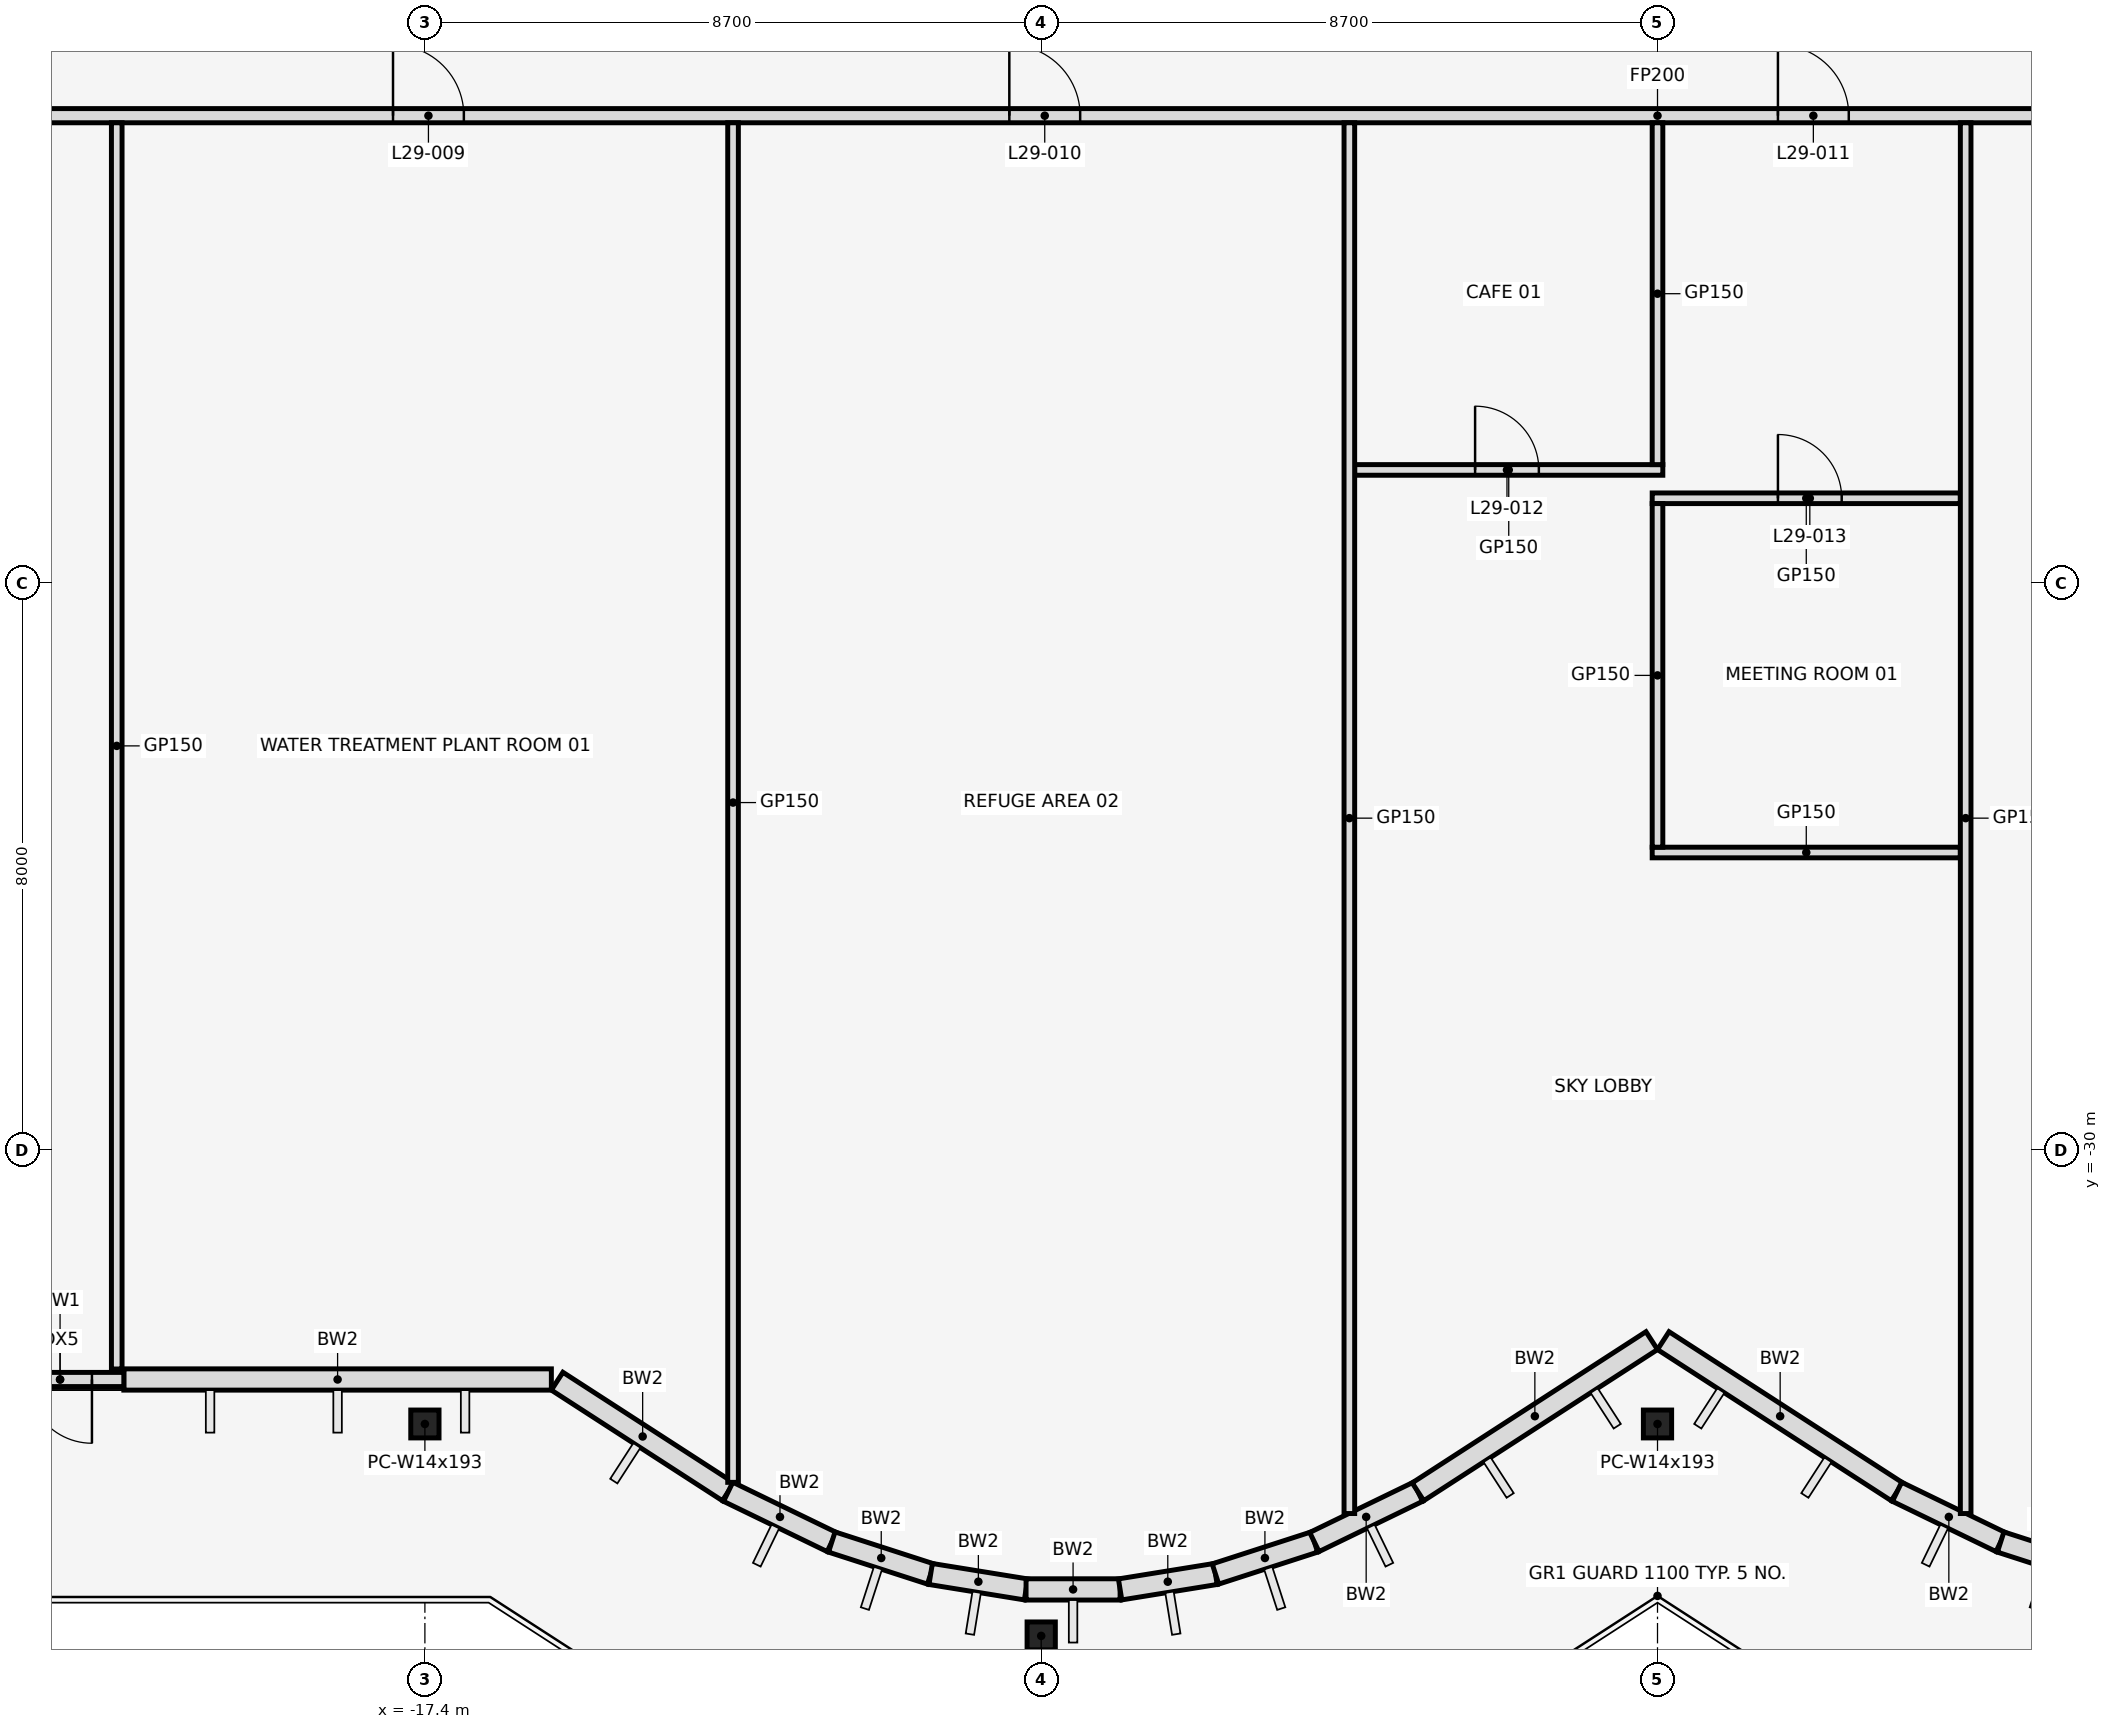
"""IFC4 building model, lengths in metres.
Left out: names, types, materials, properties, quantities, classifications, styles, units other than length and angle.
Written with IfcOpenShell. Run it as: python <this file> out.ifc"""

import sys

from ifc_helpers import new_model, si_unit, direction, frame, frame_2d, origin, origin_2d, place, context, subcontext, project, spatial, rectangle, i_section, extrude, element, fill, save


model = new_model("IFC4")
c1 = context("Model", 3, precision=1e-05, world=origin(), true_north=direction((0.0, 1.0)))
c2 = subcontext(c1, "Body", "Model", "MODEL_VIEW")
j1 = project(units=[si_unit("LENGTHUNIT", "METRE"), si_unit("PLANEANGLEUNIT", "RADIAN")], contexts=[c1])
p1 = place(None, origin())
s1 = spatial("IfcSite", under=j1, at=p1, CompositionType="ELEMENT")
p2 = place(p1, origin())
s2 = spatial("IfcBuilding", under=s1, at=p2, CompositionType="ELEMENT")
p3 = place(p2, frame((0.0, 0.0, 135.0)))
s3 = spatial("IfcBuildingStorey", under=s2, at=p3, CompositionType="ELEMENT", Elevation=135.0)
for number, where, z_axis, x_axis in (
    (1, (-17.4, -33.866, 0.0), (0.0, 0.0, 1.0), (1.0, 0.0, 0.0)),
    (2, (-8.7, -36.857, 0.0), (0.0, 0.0, 1.0), (1.0, 0.0, 0.0)),
    (3, (0.0, -33.866, 0.0), (0.0, 0.0, 1.0), (1.0, 0.0, 0.0)),
):
    element("IfcColumn", number, at=place(p3, frame(where, z_axis=z_axis, x_axis=x_axis)), inside=s3, PredefinedType="COLUMN", context=c2, shape_type="SweptSolid", body=[
        extrude(i_section(OverallWidth=0.399, OverallDepth=0.394, WebThickness=0.023, FlangeThickness=0.037, at=origin_2d()), origin(), (0.0, 0.0, 1.0), 5.4),
    ])
p4 = place(p3, frame((-21.65, -33.238, 0.0), z_axis=(0.0, 0.0, 1.0), x_axis=(1.0, 0.0, 0.0)))
e4 = element("IfcWall", 4, at=p4, inside=s3, PredefinedType="STANDARD", context=c2, shape_type="SweptSolid", body=[
    extrude(rectangle(XDim=6.035, YDim=0.3, at=frame_2d((3.018, 0.0))), origin(), (0.0, 0.0, 1.0), 4.28),
])
p5 = place(p3, frame((-15.533, -33.262, 0.0), z_axis=(0.0, 0.0, 1.0), x_axis=(0.839779682339, -0.542927329512, 0.0)))
e5 = element("IfcWall", 5, at=p5, inside=s3, PredefinedType="STANDARD", context=c2, shape_type="SweptSolid", body=[
    extrude(rectangle(XDim=2.875, YDim=0.3, at=frame_2d((1.438, 0.0))), origin(), (0.0, 0.0, 1.0), 4.26),
])
p6 = place(p3, frame((-13.119, -34.823, 0.0), z_axis=(0.0, 0.0, 1.0), x_axis=(0.899798026589, -0.436306671214, 0.0)))
e6 = element("IfcWall", 6, at=p6, inside=s3, PredefinedType="STANDARD", context=c2, shape_type="SweptSolid", body=[
    extrude(rectangle(XDim=1.625, YDim=0.3, at=frame_2d((0.813, 0.0))), origin(), (0.0, 0.0, 1.0), 4.26),
])
p7 = place(p3, frame((-11.656, -35.532, 0.0), z_axis=(0.0, 0.0, 1.0), x_axis=(0.951539081691, -0.307527845919, 0.0)))
e7 = element("IfcWall", 7, at=p7, inside=s3, PredefinedType="STANDARD", context=c2, shape_type="SweptSolid", body=[
    extrude(rectangle(XDim=1.467, YDim=0.3, at=frame_2d((0.733, 0.0))), origin(), (0.0, 0.0, 1.0), 5.25),
])
p8 = place(p3, frame((-10.26, -35.983, 0.0), z_axis=(0.0, 0.0, 1.0), x_axis=(0.987194777017, -0.15951950423, 0.0)))
e8 = element("IfcWall", 8, at=p8, inside=s3, PredefinedType="STANDARD", context=c2, shape_type="SweptSolid", body=[
    extrude(rectangle(XDim=1.364, YDim=0.3, at=frame_2d((0.682, 0.0))), origin(), (0.0, 0.0, 1.0), 4.26),
])
p9 = place(p3, frame((-8.914, -36.201, 0.0), z_axis=(0.0, 0.0, 1.0), x_axis=(1.0, 0.0, 0.0)))
e9 = element("IfcWall", 9, at=p9, inside=s3, PredefinedType="STANDARD", context=c2, shape_type="SweptSolid", body=[
    extrude(rectangle(XDim=1.328, YDim=0.3, at=frame_2d((0.664, 0.0))), origin(), (0.0, 0.0, 1.0), 4.26),
])
p10 = place(p3, frame((-7.586, -36.201, 0.0), z_axis=(0.0, 0.0, 1.0), x_axis=(0.987194777017, 0.15951950423, 0.0)))
e10 = element("IfcWall", 10, at=p10, inside=s3, PredefinedType="STANDARD", context=c2, shape_type="SweptSolid", body=[
    extrude(rectangle(XDim=1.364, YDim=0.3, at=frame_2d((0.682, 0.0))), origin(), (0.0, 0.0, 1.0), 5.25),
])
p11 = place(p3, frame((-6.24, -35.983, 0.0), z_axis=(0.0, 0.0, 1.0), x_axis=(0.951539081691, 0.307527845919, 0.0)))
e11 = element("IfcWall", 11, at=p11, inside=s3, PredefinedType="STANDARD", context=c2, shape_type="SweptSolid", body=[
    extrude(rectangle(XDim=1.467, YDim=0.3, at=frame_2d((0.733, 0.0))), origin(), (0.0, 0.0, 1.0), 5.25),
])
p12 = place(p3, frame((-4.844, -35.532, 0.0), z_axis=(0.0, 0.0, 1.0), x_axis=(0.899798026589, 0.436306671214, 0.0)))
e12 = element("IfcWall", 12, at=p12, inside=s3, PredefinedType="STANDARD", context=c2, shape_type="SweptSolid", body=[
    extrude(rectangle(XDim=1.625, YDim=0.3, at=frame_2d((0.813, 0.0))), origin(), (0.0, 0.0, 1.0), 4.26),
])
for number, where, z_axis, x_axis in (
    (13, (-3.381, -34.823, 0.0), (0.0, 0.0, 1.0), (0.84, 0.543, 0.0)),
    (14, (0.081, -32.69, 0.0), (0.0, 0.0, 1.0), (0.84, -0.543, 0.0)),
):
    element("IfcWall", number, at=place(p3, frame(where, z_axis=z_axis, x_axis=x_axis)), inside=s3, PredefinedType="STANDARD", context=c2, shape_type="SweptSolid", body=[
        extrude(rectangle(XDim=3.929, YDim=0.3, at=frame_2d((1.965, 0.0))), origin(), (0.0, 0.0, 1.0), 4.28),
    ])
p13 = place(p3, frame((3.381, -34.823, 0.0), z_axis=(0.0, 0.0, 1.0), x_axis=(0.899798026589, -0.436306671214, 0.0)))
e15 = element("IfcWall", 15, at=p13, inside=s3, PredefinedType="STANDARD", context=c2, shape_type="SweptSolid", body=[
    extrude(rectangle(XDim=1.625, YDim=0.3, at=frame_2d((0.813, 0.0))), origin(), (0.0, 0.0, 1.0), 4.26),
])
p14 = place(p3, frame((4.844, -35.532, 0.0), z_axis=(0.0, 0.0, 1.0), x_axis=(0.951539081691, -0.307527845919, 0.0)))
e16 = element("IfcWall", 16, at=p14, inside=s3, PredefinedType="STANDARD", context=c2, shape_type="SweptSolid", body=[
    extrude(rectangle(XDim=1.467, YDim=0.3, at=frame_2d((0.733, 0.0))), origin(), (0.0, 0.0, 1.0), 5.25),
])
p15 = place(p3, frame((-21.65, -33.238, 0.0), z_axis=(0.0, 0.0, 1.0), x_axis=(-1.0, 0.0, 0.0)))
e17 = element("IfcWall", 17, at=p15, inside=s3, PredefinedType="STANDARD", context=c2, shape_type="SweptSolid", body=[
    extrude(rectangle(XDim=1.8, YDim=0.2, at=frame_2d((0.9, 0.0))), origin(), (0.0, 0.0, 1.0), 5.25),
])
p16 = place(p15, frame((0.45, 0.0, 0.0)))
e18 = element("IfcOpeningElement", 18, at=p16, cuts=e17, PredefinedType="OPENING", context=c2, shape_type="SweptSolid", body=[
    extrude(rectangle(XDim=0.9, YDim=2.1, at=frame_2d((0.45, 1.05))), frame((0.0, 0.112, 0.0), z_axis=(0.0, -1.0, 0.0), x_axis=(1.0, 0.0, 0.0)), (0.0, 0.0, 1.0), 0.224),
])
p17 = place(p3, frame((-0.075, -25.8, 0.0), z_axis=(0.0, 0.0, 1.0), x_axis=(1.0, 0.0, 0.0)))
e19 = element("IfcWall", 19, at=p17, inside=s3, PredefinedType="PARTITIONING", context=c2, shape_type="SweptSolid", body=[
    extrude(rectangle(XDim=4.35, YDim=0.15, at=frame_2d((2.175, 0.0))), origin(), (0.0, 0.0, 1.0), 4.24),
])
p18 = place(p3, frame((-0.075, -20.8, 0.0), z_axis=(0.0, 0.0, 1.0), x_axis=(1.0, 0.0, 0.0)))
e20 = element("IfcWall", 20, at=p18, inside=s3, PredefinedType="PARTITIONING", context=c2, shape_type="SweptSolid", body=[
    extrude(rectangle(XDim=4.35, YDim=0.15, at=frame_2d((2.175, 0.0))), origin(), (0.0, 0.0, 1.0), 4.24),
])
p19 = place(p18, frame((1.775, 0.0, 0.0)))
e21 = element("IfcOpeningElement", 21, at=p19, cuts=e20, PredefinedType="OPENING", context=c2, shape_type="SweptSolid", body=[
    extrude(rectangle(XDim=0.9, YDim=2.1, at=frame_2d((0.45, 1.05))), frame((0.0, 0.087, 0.0), z_axis=(0.0, -1.0, 0.0), x_axis=(1.0, 0.0, 0.0)), (0.0, 0.0, 1.0), 0.174),
])
p20 = place(p3, frame((-4.275, -20.4, 0.0), z_axis=(0.0, 0.0, 1.0), x_axis=(1.0, 0.0, 0.0)))
e22 = element("IfcWall", 22, at=p20, inside=s3, PredefinedType="PARTITIONING", context=c2, shape_type="SweptSolid", body=[
    extrude(rectangle(XDim=4.35, YDim=0.15, at=frame_2d((2.175, 0.0))), origin(), (0.0, 0.0, 1.0), 4.24),
])
p21 = place(p20, frame((1.7, 0.0, 0.0)))
e23 = element("IfcOpeningElement", 23, at=p21, cuts=e22, PredefinedType="OPENING", context=c2, shape_type="SweptSolid", body=[
    extrude(rectangle(XDim=0.9, YDim=2.1, at=frame_2d((0.45, 1.05))), frame((0.0, 0.087, 0.0), z_axis=(0.0, -1.0, 0.0), x_axis=(1.0, 0.0, 0.0)), (0.0, 0.0, 1.0), 0.174),
])
p22 = place(p3, frame((-32.7, -15.4, 0.0), z_axis=(0.0, 0.0, 1.0), x_axis=(1.0, 0.0, 0.0)))
e24 = element("IfcWall", 24, at=p22, inside=s3, PredefinedType="PARTITIONING", context=c2, shape_type="SweptSolid", body=[
    extrude(rectangle(XDim=65.4, YDim=0.2, at=frame_2d((32.7, 0.0))), origin(), (0.0, 0.0, 1.0), 4.24),
])
p23 = place(p22, frame((0.7, 0.0, 0.0)))
e25 = element("IfcOpeningElement", 25, at=p23, cuts=e24, PredefinedType="OPENING", context=c2, shape_type="SweptSolid", body=[
    extrude(rectangle(XDim=0.9, YDim=2.1, at=frame_2d((0.45, 1.05))), frame((0.0, 0.112, 0.0), z_axis=(0.0, -1.0, 0.0), x_axis=(1.0, 0.0, 0.0)), (0.0, 0.0, 1.0), 0.224),
])
p24 = place(p22, frame((5.95, 0.0, 0.0)))
e26 = element("IfcOpeningElement", 26, at=p24, cuts=e24, PredefinedType="OPENING", context=c2, shape_type="SweptSolid", body=[
    extrude(rectangle(XDim=1.0, YDim=2.1, at=frame_2d((0.5, 1.05))), frame((0.0, 0.112, 0.0), z_axis=(0.0, -1.0, 0.0), x_axis=(1.0, 0.0, 0.0)), (0.0, 0.0, 1.0), 0.224),
])
p25 = place(p22, frame((14.85, 0.0, 0.0)))
e27 = element("IfcOpeningElement", 27, at=p25, cuts=e24, PredefinedType="OPENING", context=c2, shape_type="SweptSolid", body=[
    extrude(rectangle(XDim=1.0, YDim=2.1, at=frame_2d((0.5, 1.05))), frame((0.0, 0.112, 0.0), z_axis=(0.0, -1.0, 0.0), x_axis=(1.0, 0.0, 0.0)), (0.0, 0.0, 1.0), 0.224),
])
p26 = place(p22, frame((23.55, 0.0, 0.0)))
e28 = element("IfcOpeningElement", 28, at=p26, cuts=e24, PredefinedType="OPENING", context=c2, shape_type="SweptSolid", body=[
    extrude(rectangle(XDim=1.0, YDim=2.1, at=frame_2d((0.5, 1.05))), frame((0.0, 0.112, 0.0), z_axis=(0.0, -1.0, 0.0), x_axis=(1.0, 0.0, 0.0)), (0.0, 0.0, 1.0), 0.224),
])
p27 = place(p22, frame((34.4, 0.0, 0.0)))
e29 = element("IfcOpeningElement", 29, at=p27, cuts=e24, PredefinedType="OPENING", context=c2, shape_type="SweptSolid", body=[
    extrude(rectangle(XDim=1.0, YDim=2.1, at=frame_2d((0.5, 1.05))), frame((0.0, 0.112, 0.0), z_axis=(0.0, -1.0, 0.0), x_axis=(1.0, 0.0, 0.0)), (0.0, 0.0, 1.0), 0.224),
])
p28 = place(p22, frame((40.95, 0.0, 0.0)))
e30 = element("IfcOpeningElement", 30, at=p28, cuts=e24, PredefinedType="OPENING", context=c2, shape_type="SweptSolid", body=[
    extrude(rectangle(XDim=1.0, YDim=2.1, at=frame_2d((0.5, 1.05))), frame((0.0, 0.112, 0.0), z_axis=(0.0, -1.0, 0.0), x_axis=(1.0, 0.0, 0.0)), (0.0, 0.0, 1.0), 0.224),
])
p29 = place(p22, frame((49.65, 0.0, 0.0)))
e31 = element("IfcOpeningElement", 31, at=p29, cuts=e24, PredefinedType="OPENING", context=c2, shape_type="SweptSolid", body=[
    extrude(rectangle(XDim=0.9, YDim=2.1, at=frame_2d((0.45, 1.05))), frame((0.0, 0.112, 0.0), z_axis=(0.0, -1.0, 0.0), x_axis=(1.0, 0.0, 0.0)), (0.0, 0.0, 1.0), 0.224),
])
p30 = place(p22, frame((58.45, 0.0, 0.0)))
e32 = element("IfcOpeningElement", 32, at=p30, cuts=e24, PredefinedType="OPENING", context=c2, shape_type="SweptSolid", body=[
    extrude(rectangle(XDim=1.0, YDim=2.1, at=frame_2d((0.5, 1.05))), frame((0.0, 0.112, 0.0), z_axis=(0.0, -1.0, 0.0), x_axis=(1.0, 0.0, 0.0)), (0.0, 0.0, 1.0), 0.224),
])
p31 = place(p22, frame((63.85, 0.0, 0.0)))
e33 = element("IfcOpeningElement", 33, at=p31, cuts=e24, PredefinedType="OPENING", context=c2, shape_type="SweptSolid", body=[
    extrude(rectangle(XDim=0.9, YDim=2.1, at=frame_2d((0.45, 1.05))), frame((0.0, 0.112, 0.0), z_axis=(0.0, -1.0, 0.0), x_axis=(1.0, 0.0, 0.0)), (0.0, 0.0, 1.0), 0.224),
])
p32 = place(p3, frame((-21.75, -33.09, 0.0), z_axis=(0.0, 0.0, 1.0), x_axis=(0.0, 1.0, 0.0)))
e34 = element("IfcWall", 34, at=p32, inside=s3, PredefinedType="PARTITIONING", context=c2, shape_type="SweptSolid", body=[
    extrude(rectangle(XDim=17.59, YDim=0.15, at=frame_2d((8.795, 0.0))), origin(), (0.0, 0.0, 1.0), 4.24),
])
p33 = place(p3, frame((-13.05, -34.69, 0.0), z_axis=(0.0, 0.0, 1.0), x_axis=(0.0, 1.0, 0.0)))
e35 = element("IfcWall", 35, at=p33, inside=s3, PredefinedType="PARTITIONING", context=c2, shape_type="SweptSolid", body=[
    extrude(rectangle(XDim=19.19, YDim=0.15, at=frame_2d((9.595, 0.0))), origin(), (0.0, 0.0, 1.0), 4.24),
])
p34 = place(p3, frame((-4.35, -35.13, 0.0), z_axis=(0.0, 0.0, 1.0), x_axis=(0.0, 1.0, 0.0)))
e36 = element("IfcWall", 36, at=p34, inside=s3, PredefinedType="PARTITIONING", context=c2, shape_type="SweptSolid", body=[
    extrude(rectangle(XDim=19.63, YDim=0.15, at=frame_2d((9.815, 0.0))), origin(), (0.0, 0.0, 1.0), 4.24),
])
p35 = place(p3, frame((0.0, -25.725, 0.0), z_axis=(0.0, 0.0, 1.0), x_axis=(0.0, 1.0, 0.0)))
e37 = element("IfcWall", 37, at=p35, inside=s3, PredefinedType="PARTITIONING", context=c2, shape_type="SweptSolid", body=[
    extrude(rectangle(XDim=4.85, YDim=0.15, at=frame_2d((2.425, 0.0))), origin(), (0.0, 0.0, 1.0), 4.24),
])
p36 = place(p3, frame((0.0, -20.325, 0.0), z_axis=(0.0, 0.0, 1.0), x_axis=(0.0, 1.0, 0.0)))
e38 = element("IfcWall", 38, at=p36, inside=s3, PredefinedType="PARTITIONING", context=c2, shape_type="SweptSolid", body=[
    extrude(rectangle(XDim=4.825, YDim=0.15, at=frame_2d((2.413, 0.0))), origin(), (0.0, 0.0, 1.0), 4.24),
])
p37 = place(p3, frame((4.35, -35.13, 0.0), z_axis=(0.0, 0.0, 1.0), x_axis=(0.0, 1.0, 0.0)))
e39 = element("IfcWall", 39, at=p37, inside=s3, PredefinedType="PARTITIONING", context=c2, shape_type="SweptSolid", body=[
    extrude(rectangle(XDim=19.63, YDim=0.15, at=frame_2d((9.815, 0.0))), origin(), (0.0, 0.0, 1.0), 4.24),
])
p38 = place(p16, origin())
e40 = element("IfcDoor", 40, at=p38, inside=s3, OperationType="SINGLE_SWING_LEFT", PredefinedType="DOOR", context=c2, shape_type="SweptSolid", body=[
    extrude(rectangle(XDim=0.9, YDim=2.1, at=frame_2d((0.45, 1.05))), frame((0.0, 0.025, 0.0), z_axis=(0.0, -1.0, 0.0), x_axis=(1.0, 0.0, 0.0)), (0.0, 0.0, 1.0), 0.05),
])
fill(e18, e40)
p39 = place(p25, frame((1.0, 0.0, 0.0), z_axis=(0.0, 0.0, 1.0), x_axis=(-1.0, 0.0, 0.0)))
e41 = element("IfcDoor", 41, at=p39, inside=s3, OperationType="SINGLE_SWING_RIGHT", PredefinedType="DOOR", context=c2, shape_type="SweptSolid", body=[
    extrude(rectangle(XDim=1.0, YDim=2.1, at=frame_2d((0.5, 1.05))), frame((0.0, 0.025, 0.0), z_axis=(0.0, -1.0, 0.0), x_axis=(1.0, 0.0, 0.0)), (0.0, 0.0, 1.0), 0.05),
])
fill(e27, e41)
p40 = place(p26, frame((1.0, 0.0, 0.0), z_axis=(0.0, 0.0, 1.0), x_axis=(-1.0, 0.0, 0.0)))
e42 = element("IfcDoor", 42, at=p40, inside=s3, OperationType="SINGLE_SWING_LEFT", PredefinedType="DOOR", context=c2, shape_type="SweptSolid", body=[
    extrude(rectangle(XDim=1.0, YDim=2.1, at=frame_2d((0.5, 1.05))), frame((0.0, 0.025, 0.0), z_axis=(0.0, -1.0, 0.0), x_axis=(1.0, 0.0, 0.0)), (0.0, 0.0, 1.0), 0.05),
])
fill(e28, e42)
p41 = place(p27, frame((1.0, 0.0, 0.0), z_axis=(0.0, 0.0, 1.0), x_axis=(-1.0, 0.0, 0.0)))
e43 = element("IfcDoor", 43, at=p41, inside=s3, OperationType="SINGLE_SWING_RIGHT", PredefinedType="DOOR", context=c2, shape_type="SweptSolid", body=[
    extrude(rectangle(XDim=1.0, YDim=2.1, at=frame_2d((0.5, 1.05))), frame((0.0, 0.025, 0.0), z_axis=(0.0, -1.0, 0.0), x_axis=(1.0, 0.0, 0.0)), (0.0, 0.0, 1.0), 0.05),
])
fill(e29, e43)
p42 = place(p21, origin())
e44 = element("IfcDoor", 44, at=p42, inside=s3, OperationType="SINGLE_SWING_RIGHT", PredefinedType="DOOR", context=c2, shape_type="SweptSolid", body=[
    extrude(rectangle(XDim=0.9, YDim=2.1, at=frame_2d((0.45, 1.05))), frame((0.0, 0.025, 0.0), z_axis=(0.0, -1.0, 0.0), x_axis=(1.0, 0.0, 0.0)), (0.0, 0.0, 1.0), 0.05),
])
fill(e23, e44)
p43 = place(p19, frame((0.9, 0.0, 0.0), z_axis=(0.0, 0.0, 1.0), x_axis=(-1.0, 0.0, 0.0)))
e45 = element("IfcDoor", 45, at=p43, inside=s3, OperationType="SINGLE_SWING_LEFT", PredefinedType="DOOR", context=c2, shape_type="SweptSolid", body=[
    extrude(rectangle(XDim=0.9, YDim=2.1, at=frame_2d((0.45, 1.05))), frame((0.0, 0.025, 0.0), z_axis=(0.0, -1.0, 0.0), x_axis=(1.0, 0.0, 0.0)), (0.0, 0.0, 1.0), 0.05),
])
fill(e21, e45)
save(model, sys.argv[1])
